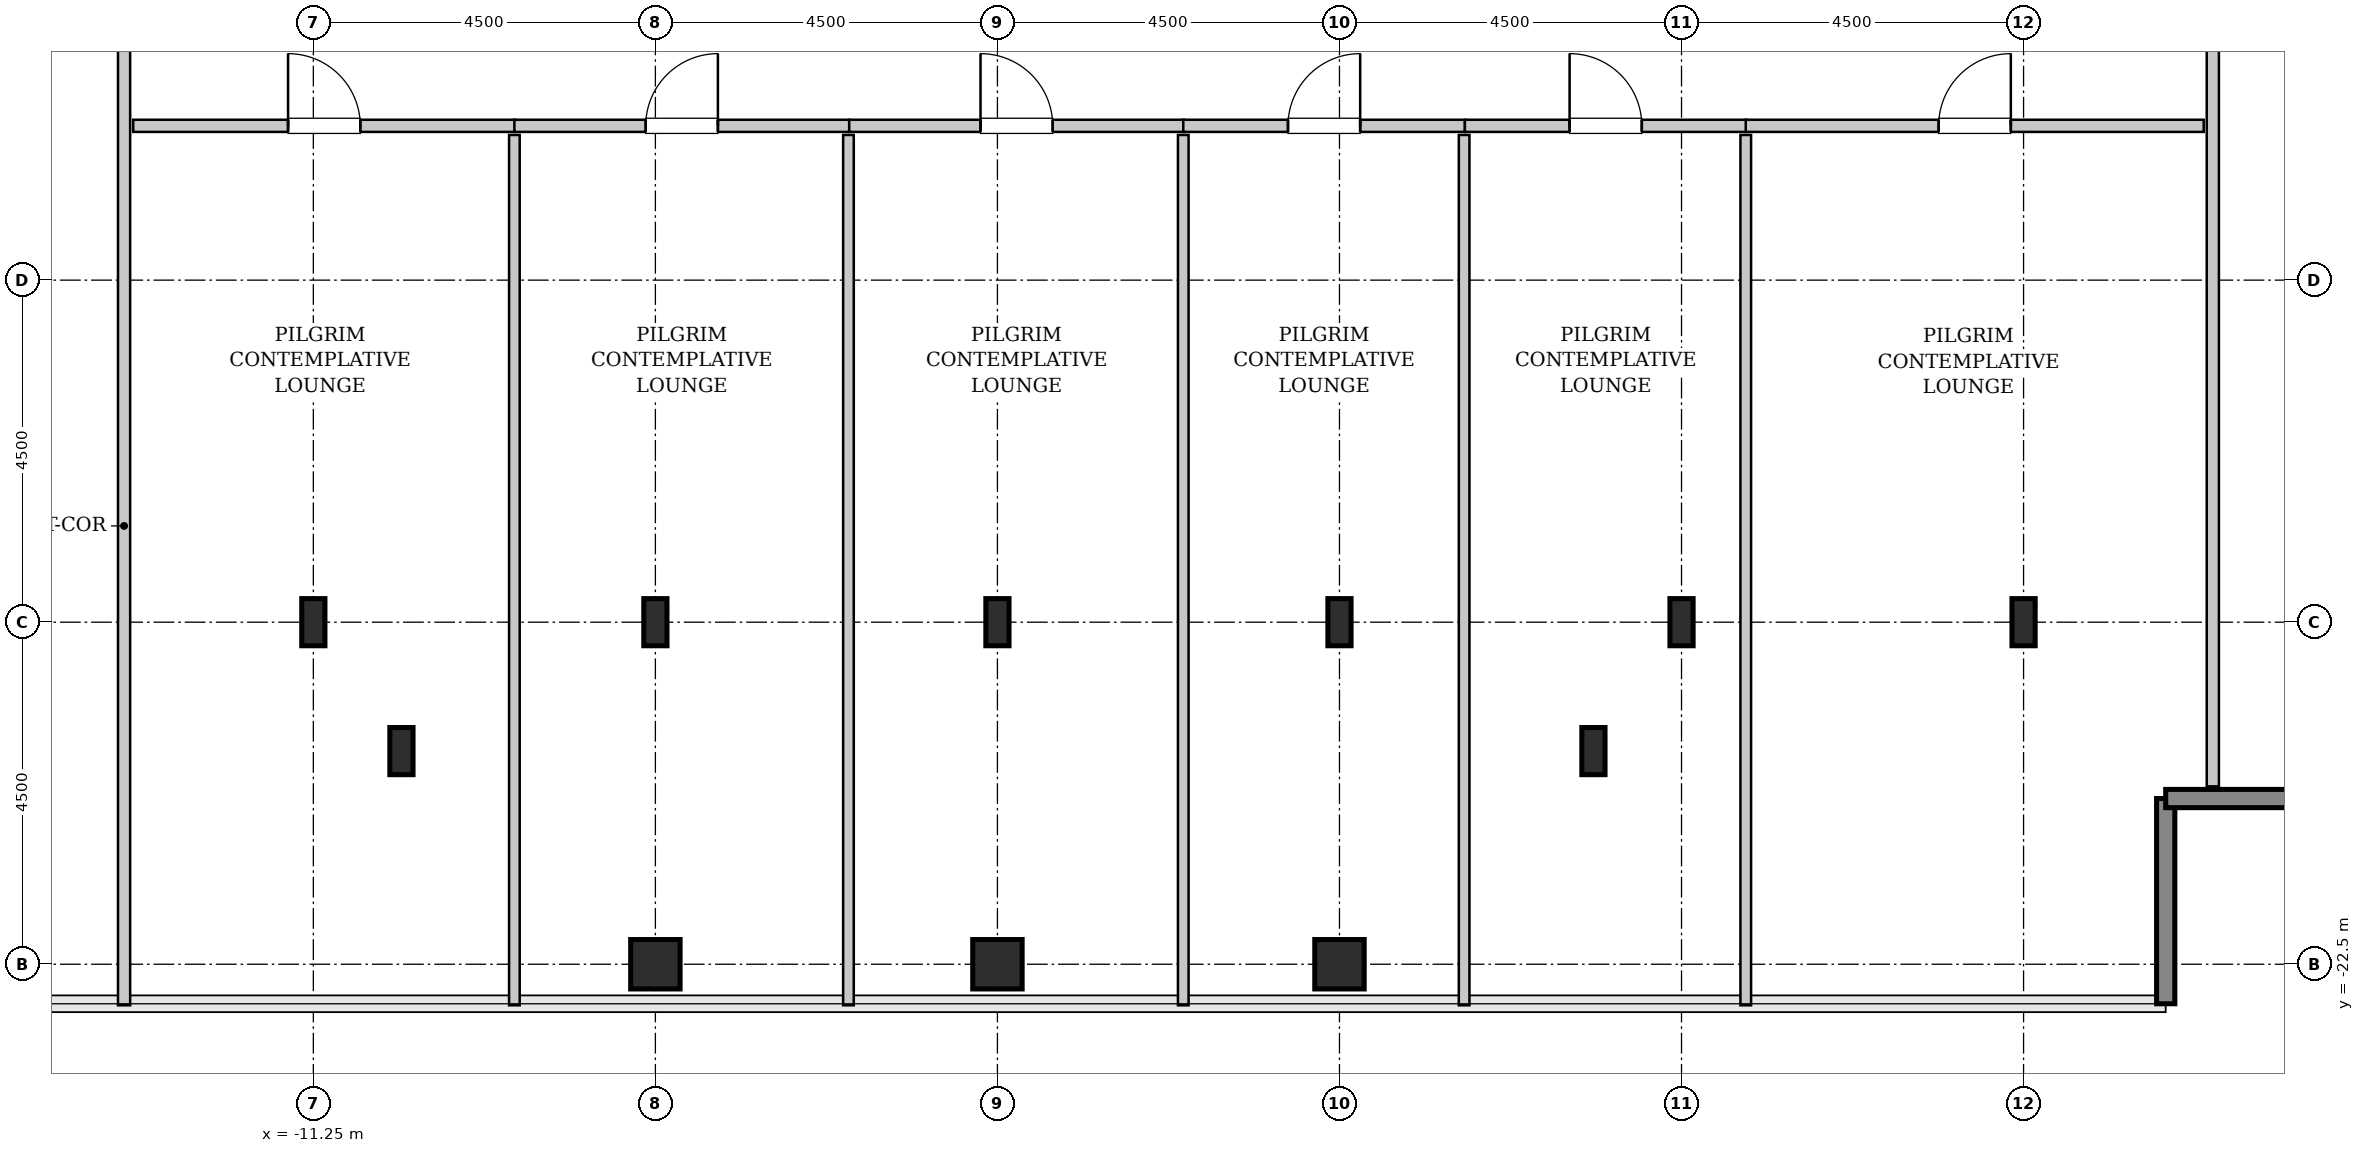
"""IFC4 building model, lengths in metres.
Left out: names, types, materials, properties, quantities, classifications, styles, units other than length and angle.
Written with IfcOpenShell. Run it as: python <this file> out.ifc"""

import sys

from ifc_helpers import new_model, si_unit, direction, frame, frame_2d, origin, origin_2d, place, context, subcontext, project, spatial, rectangle, hollow_rectangle, i_section, extrude, source, transform, mapped, element, fill, save


model = new_model("IFC4")
c1 = context("Model", 3, precision=1e-05, world=origin(), true_north=direction((0.0, 1.0)))
c2 = subcontext(c1, "Body", "Model", "MODEL_VIEW")
j1 = project(units=[si_unit("LENGTHUNIT", "METRE"), si_unit("PLANEANGLEUNIT", "RADIAN")], contexts=[c1])
p1 = place(None, origin())
s1 = spatial("IfcSite", under=j1, at=p1, CompositionType="ELEMENT")
p2 = place(p1, origin())
s2 = spatial("IfcBuilding", under=s1, at=p2, CompositionType="ELEMENT")
p3 = place(p2, frame((0.0, 0.0, 276.0)))
s3 = spatial("IfcBuildingStorey", under=s2, at=p3, CompositionType="ELEMENT", Elevation=276.0)
m1 = source(origin(), c2, "Body", "SweptSolid", [
    extrude(i_section(OverallWidth=0.305, OverallDepth=0.62, WebThickness=0.021, FlangeThickness=0.04, FilletRadius=0.027, at=origin_2d()), origin(), (0.0, 0.0, 1.0), 3.8),
])
for number, where, z_axis, x_axis in (
    (1, (-11.25, -18.0, 0.0), (0.0, 0.0, 1.0), (1.0, 0.0, 0.0)),
    (2, (-10.091, -19.696, 0.0), (0.0, 0.0, 1.0), (1.0, 0.0, 0.0)),
):
    element("IfcColumn", number, at=place(p3, frame(where, z_axis=z_axis, x_axis=x_axis)), inside=s3, PredefinedType="COLUMN", context=c2, shape_type="MappedRepresentation", body=[
        mapped(m1, transform((0.0, 0.0, 0.0), x_axis=(1.0, 0.0, 0.0), y_axis=(0.0, 1.0, 0.0), z_axis=(0.0, 0.0, 1.0), scale=1.0)),
    ])
m2 = source(origin(), c2, "Body", "SweptSolid", [
    extrude(hollow_rectangle(XDim=0.65, YDim=0.65, WallThickness=0.032, InnerFilletRadius=0.032, OuterFilletRadius=0.064, at=origin_2d()), origin(), (0.0, 0.0, 1.0), 3.8),
])
p4 = place(p3, frame((-6.75, -22.5, 0.0), z_axis=(0.0, 0.0, 1.0), x_axis=(1.0, 0.0, 0.0)))
e3 = element("IfcColumn", 3, at=p4, inside=s3, PredefinedType="COLUMN", context=c2, shape_type="MappedRepresentation", body=[
    mapped(m2, transform((0.0, 0.0, 0.0), x_axis=(1.0, 0.0, 0.0), y_axis=(0.0, 1.0, 0.0), z_axis=(0.0, 0.0, 1.0), scale=1.0)),
])
p5 = place(p3, frame((-6.75, -18.0, 0.0), z_axis=(0.0, 0.0, 1.0), x_axis=(1.0, 0.0, 0.0)))
e4 = element("IfcColumn", 4, at=p5, inside=s3, PredefinedType="COLUMN", context=c2, shape_type="MappedRepresentation", body=[
    mapped(m1, transform((0.0, 0.0, 0.0), x_axis=(1.0, 0.0, 0.0), y_axis=(0.0, 1.0, 0.0), z_axis=(0.0, 0.0, 1.0), scale=1.0)),
])
p6 = place(p3, frame((-2.25, -22.5, 0.0), z_axis=(0.0, 0.0, 1.0), x_axis=(1.0, 0.0, 0.0)))
e5 = element("IfcColumn", 5, at=p6, inside=s3, PredefinedType="COLUMN", context=c2, shape_type="MappedRepresentation", body=[
    mapped(m2, transform((0.0, 0.0, 0.0), x_axis=(1.0, 0.0, 0.0), y_axis=(0.0, 1.0, 0.0), z_axis=(0.0, 0.0, 1.0), scale=1.0)),
])
p7 = place(p3, frame((-2.25, -18.0, 0.0), z_axis=(0.0, 0.0, 1.0), x_axis=(1.0, 0.0, 0.0)))
e6 = element("IfcColumn", 6, at=p7, inside=s3, PredefinedType="COLUMN", context=c2, shape_type="MappedRepresentation", body=[
    mapped(m1, transform((0.0, 0.0, 0.0), x_axis=(1.0, 0.0, 0.0), y_axis=(0.0, 1.0, 0.0), z_axis=(0.0, 0.0, 1.0), scale=1.0)),
])
p8 = place(p3, frame((2.25, -22.5, 0.0), z_axis=(0.0, 0.0, 1.0), x_axis=(1.0, 0.0, 0.0)))
e7 = element("IfcColumn", 7, at=p8, inside=s3, PredefinedType="COLUMN", context=c2, shape_type="MappedRepresentation", body=[
    mapped(m2, transform((0.0, 0.0, 0.0), x_axis=(1.0, 0.0, 0.0), y_axis=(0.0, 1.0, 0.0), z_axis=(0.0, 0.0, 1.0), scale=1.0)),
])
for number, where, z_axis, x_axis in (
    (8, (2.25, -18.0, 0.0), (0.0, 0.0, 1.0), (1.0, 0.0, 0.0)),
    (9, (5.591, -19.696, 0.0), (0.0, 0.0, 1.0), (1.0, 0.0, 0.0)),
    (10, (6.75, -18.0, 0.0), (0.0, 0.0, 1.0), (1.0, 0.0, 0.0)),
    (11, (11.25, -18.0, 0.0), (0.0, 0.0, 1.0), (1.0, 0.0, 0.0)),
):
    element("IfcColumn", number, at=place(p3, frame(where, z_axis=z_axis, x_axis=x_axis)), inside=s3, PredefinedType="COLUMN", context=c2, shape_type="MappedRepresentation", body=[
        mapped(m1, transform((0.0, 0.0, 0.0), x_axis=(1.0, 0.0, 0.0), y_axis=(0.0, 1.0, 0.0), z_axis=(0.0, 0.0, 1.0), scale=1.0)),
    ])
m3 = source(origin(), c2, "Body", "SweptSolid", [
    extrude(rectangle(XDim=2.7, YDim=0.24, at=frame_2d((1.35, 0.0))), origin(), (0.0, 0.0, 1.0), 3.55),
])
for number, where, z_axis, x_axis in (
    (12, (13.12, -23.02, 0.0), (0.0, 0.0, 1.0), (0.0, 1.0, 0.0)),
    (13, (13.12, -20.32, 0.0), (0.0, 0.0, 1.0), (1.0, 0.0, 0.0)),
):
    element("IfcWall", number, at=place(p3, frame(where, z_axis=z_axis, x_axis=x_axis)), inside=s3, PredefinedType="SHEAR", context=c2, shape_type="MappedRepresentation", body=[
        mapped(m3, transform((0.0, 0.0, 0.0), x_axis=(1.0, 0.0, 0.0), y_axis=(0.0, 1.0, 0.0), z_axis=(0.0, 0.0, 1.0), scale=1.0)),
    ])
m4 = source(origin(), c2, "Body", "SweptSolid", [
    extrude(rectangle(XDim=14.545, YDim=0.16, at=frame_2d((7.272, 0.0))), origin(), (0.0, 0.0, 1.0), 3.535),
])
p9 = place(p3, frame((-13.74, -23.04, 0.0), z_axis=(0.0, 0.0, 1.0), x_axis=(0.0, 1.0, 0.0)))
e14 = element("IfcWall", 14, at=p9, inside=s3, PredefinedType="PARTITIONING", context=c2, shape_type="MappedRepresentation", body=[
    mapped(m4, transform((0.0, 0.0, 0.0), x_axis=(1.0, 0.0, 0.0), y_axis=(0.0, 1.0, 0.0), z_axis=(0.0, 0.0, 1.0), scale=1.0)),
])
p10 = place(p9, frame((12.562, 0.0, 0.0)))
e15 = element("IfcOpeningElement", 15, at=p10, cuts=e14, PredefinedType="OPENING", context=c2, shape_type="SweptSolid", body=[
    extrude(rectangle(XDim=0.95, YDim=2.1, at=frame_2d((0.475, 1.05))), frame((0.0, 0.09, 0.0), z_axis=(0.0, -1.0, 0.0), x_axis=(1.0, 0.0, 0.0)), (0.0, 0.0, 1.0), 0.18),
])
m5 = source(origin(), c2, "Body", "SweptSolid", [
    extrude(rectangle(XDim=12.965, YDim=0.16, at=frame_2d((6.482, 0.0))), origin(), (0.0, 0.0, 1.0), 3.535),
])
p11 = place(p3, frame((13.74, -20.16, 0.0), z_axis=(0.0, 0.0, 1.0), x_axis=(0.0, 1.0, 0.0)))
e16 = element("IfcWall", 16, at=p11, inside=s3, PredefinedType="PARTITIONING", context=c2, shape_type="MappedRepresentation", body=[
    mapped(m5, transform((0.0, 0.0, 0.0), x_axis=(1.0, 0.0, 0.0), y_axis=(0.0, 1.0, 0.0), z_axis=(0.0, 0.0, 1.0), scale=1.0)),
])
p12 = place(p11, frame((10.333, 0.0, 0.0)))
e17 = element("IfcOpeningElement", 17, at=p12, cuts=e16, PredefinedType="OPENING", context=c2, shape_type="SweptSolid", body=[
    extrude(rectangle(XDim=0.95, YDim=2.1, at=frame_2d((0.475, 1.05))), frame((0.0, 0.09, 0.0), z_axis=(0.0, -1.0, 0.0), x_axis=(1.0, 0.0, 0.0)), (0.0, 0.0, 1.0), 0.18),
])
m6 = source(origin(), c2, "Body", "SweptSolid", [
    extrude(rectangle(XDim=5.025, YDim=0.16, at=frame_2d((2.513, 0.0))), origin(), (0.0, 0.0, 1.0), 3.535),
])
p13 = place(p3, frame((-13.62, -11.47, 0.0), z_axis=(0.0, 0.0, 1.0), x_axis=(1.0, 0.0, 0.0)))
e18 = element("IfcWall", 18, at=p13, inside=s3, PredefinedType="PARTITIONING", context=c2, shape_type="MappedRepresentation", body=[
    mapped(m6, transform((0.0, 0.0, 0.0), x_axis=(1.0, 0.0, 0.0), y_axis=(0.0, 1.0, 0.0), z_axis=(0.0, 0.0, 1.0), scale=1.0)),
])
p14 = place(p13, frame((2.038, 0.0, 0.0)))
e19 = element("IfcOpeningElement", 19, at=p14, cuts=e18, PredefinedType="OPENING", context=c2, shape_type="SweptSolid", body=[
    extrude(rectangle(XDim=0.95, YDim=2.1, at=frame_2d((0.475, 1.05))), frame((0.0, 0.09, 0.0), z_axis=(0.0, -1.0, 0.0), x_axis=(1.0, 0.0, 0.0)), (0.0, 0.0, 1.0), 0.18),
])
m7 = source(origin(), c2, "Body", "SweptSolid", [
    extrude(rectangle(XDim=11.45, YDim=0.14, at=frame_2d((5.725, 0.0))), origin(), (0.0, 0.0, 1.0), 3.535),
])
p15 = place(p3, frame((-8.605, -23.04, 0.0), z_axis=(0.0, 0.0, 1.0), x_axis=(0.0, 1.0, 0.0)))
e20 = element("IfcWall", 20, at=p15, inside=s3, PredefinedType="PARTITIONING", context=c2, shape_type="MappedRepresentation", body=[
    mapped(m7, transform((0.0, 0.0, 0.0), x_axis=(1.0, 0.0, 0.0), y_axis=(0.0, 1.0, 0.0), z_axis=(0.0, 0.0, 1.0), scale=1.0)),
])
m8 = source(origin(), c2, "Body", "SweptSolid", [
    extrude(rectangle(XDim=4.405, YDim=0.16, at=frame_2d((2.203, 0.0))), origin(), (0.0, 0.0, 1.0), 3.535),
])
p16 = place(p3, frame((-8.605, -11.47, 0.0), z_axis=(0.0, 0.0, 1.0), x_axis=(1.0, 0.0, 0.0)))
e21 = element("IfcWall", 21, at=p16, inside=s3, PredefinedType="PARTITIONING", context=c2, shape_type="MappedRepresentation", body=[
    mapped(m8, transform((0.0, 0.0, 0.0), x_axis=(1.0, 0.0, 0.0), y_axis=(0.0, 1.0, 0.0), z_axis=(0.0, 0.0, 1.0), scale=1.0)),
])
p17 = place(p16, frame((1.728, 0.0, 0.0)))
e22 = element("IfcOpeningElement", 22, at=p17, cuts=e21, PredefinedType="OPENING", context=c2, shape_type="SweptSolid", body=[
    extrude(rectangle(XDim=0.95, YDim=2.1, at=frame_2d((0.475, 1.05))), frame((0.0, 0.09, 0.0), z_axis=(0.0, -1.0, 0.0), x_axis=(1.0, 0.0, 0.0)), (0.0, 0.0, 1.0), 0.18),
])
p18 = place(p3, frame((-4.21, -23.04, 0.0), z_axis=(0.0, 0.0, 1.0), x_axis=(0.0, 1.0, 0.0)))
e23 = element("IfcWall", 23, at=p18, inside=s3, PredefinedType="PARTITIONING", context=c2, shape_type="MappedRepresentation", body=[
    mapped(m7, transform((0.0, 0.0, 0.0), x_axis=(1.0, 0.0, 0.0), y_axis=(0.0, 1.0, 0.0), z_axis=(0.0, 0.0, 1.0), scale=1.0)),
])
p19 = place(p3, frame((-4.2, -11.47, 0.0), z_axis=(0.0, 0.0, 1.0), x_axis=(1.0, 0.0, 0.0)))
e24 = element("IfcWall", 24, at=p19, inside=s3, PredefinedType="PARTITIONING", context=c2, shape_type="MappedRepresentation", body=[
    mapped(m8, transform((0.0, 0.0, 0.0), x_axis=(1.0, 0.0, 0.0), y_axis=(0.0, 1.0, 0.0), z_axis=(0.0, 0.0, 1.0), scale=1.0)),
])
p20 = place(p19, frame((1.728, 0.0, 0.0)))
e25 = element("IfcOpeningElement", 25, at=p20, cuts=e24, PredefinedType="OPENING", context=c2, shape_type="SweptSolid", body=[
    extrude(rectangle(XDim=0.95, YDim=2.1, at=frame_2d((0.475, 1.05))), frame((0.0, 0.09, 0.0), z_axis=(0.0, -1.0, 0.0), x_axis=(1.0, 0.0, 0.0)), (0.0, 0.0, 1.0), 0.18),
])
p21 = place(p3, frame((0.195, -23.04, 0.0), z_axis=(0.0, 0.0, 1.0), x_axis=(0.0, 1.0, 0.0)))
e26 = element("IfcWall", 26, at=p21, inside=s3, PredefinedType="PARTITIONING", context=c2, shape_type="MappedRepresentation", body=[
    mapped(m7, transform((0.0, 0.0, 0.0), x_axis=(1.0, 0.0, 0.0), y_axis=(0.0, 1.0, 0.0), z_axis=(0.0, 0.0, 1.0), scale=1.0)),
])
m9 = source(origin(), c2, "Body", "SweptSolid", [
    extrude(rectangle(XDim=3.705, YDim=0.16, at=frame_2d((1.853, 0.0))), origin(), (0.0, 0.0, 1.0), 3.535),
])
p22 = place(p3, frame((0.195, -11.47, 0.0), z_axis=(0.0, 0.0, 1.0), x_axis=(1.0, 0.0, 0.0)))
e27 = element("IfcWall", 27, at=p22, inside=s3, PredefinedType="PARTITIONING", context=c2, shape_type="MappedRepresentation", body=[
    mapped(m9, transform((0.0, 0.0, 0.0), x_axis=(1.0, 0.0, 0.0), y_axis=(0.0, 1.0, 0.0), z_axis=(0.0, 0.0, 1.0), scale=1.0)),
])
p23 = place(p22, frame((1.377, 0.0, 0.0)))
e28 = element("IfcOpeningElement", 28, at=p23, cuts=e27, PredefinedType="OPENING", context=c2, shape_type="SweptSolid", body=[
    extrude(rectangle(XDim=0.95, YDim=2.1, at=frame_2d((0.475, 1.05))), frame((0.0, 0.09, 0.0), z_axis=(0.0, -1.0, 0.0), x_axis=(1.0, 0.0, 0.0)), (0.0, 0.0, 1.0), 0.18),
])
p24 = place(p3, frame((3.89, -23.04, 0.0), z_axis=(0.0, 0.0, 1.0), x_axis=(0.0, 1.0, 0.0)))
e29 = element("IfcWall", 29, at=p24, inside=s3, PredefinedType="PARTITIONING", context=c2, shape_type="MappedRepresentation", body=[
    mapped(m7, transform((0.0, 0.0, 0.0), x_axis=(1.0, 0.0, 0.0), y_axis=(0.0, 1.0, 0.0), z_axis=(0.0, 0.0, 1.0), scale=1.0)),
])
m10 = source(origin(), c2, "Body", "SweptSolid", [
    extrude(rectangle(XDim=3.705, YDim=0.16, at=frame_2d((1.853, 0.0))), origin(), (0.0, 0.0, 1.0), 3.535),
])
p25 = place(p3, frame((3.9, -11.47, 0.0), z_axis=(0.0, 0.0, 1.0), x_axis=(1.0, 0.0, 0.0)))
e30 = element("IfcWall", 30, at=p25, inside=s3, PredefinedType="PARTITIONING", context=c2, shape_type="MappedRepresentation", body=[
    mapped(m10, transform((0.0, 0.0, 0.0), x_axis=(1.0, 0.0, 0.0), y_axis=(0.0, 1.0, 0.0), z_axis=(0.0, 0.0, 1.0), scale=1.0)),
])
p26 = place(p25, frame((1.377, 0.0, 0.0)))
e31 = element("IfcOpeningElement", 31, at=p26, cuts=e30, PredefinedType="OPENING", context=c2, shape_type="SweptSolid", body=[
    extrude(rectangle(XDim=0.95, YDim=2.1, at=frame_2d((0.475, 1.05))), frame((0.0, 0.09, 0.0), z_axis=(0.0, -1.0, 0.0), x_axis=(1.0, 0.0, 0.0)), (0.0, 0.0, 1.0), 0.18),
])
p27 = place(p3, frame((7.595, -23.04, 0.0), z_axis=(0.0, 0.0, 1.0), x_axis=(0.0, 1.0, 0.0)))
e32 = element("IfcWall", 32, at=p27, inside=s3, PredefinedType="PARTITIONING", context=c2, shape_type="MappedRepresentation", body=[
    mapped(m7, transform((0.0, 0.0, 0.0), x_axis=(1.0, 0.0, 0.0), y_axis=(0.0, 1.0, 0.0), z_axis=(0.0, 0.0, 1.0), scale=1.0)),
])
m11 = source(origin(), c2, "Body", "SweptSolid", [
    extrude(rectangle(XDim=6.025, YDim=0.16, at=frame_2d((3.013, 0.0))), origin(), (0.0, 0.0, 1.0), 3.535),
])
p28 = place(p3, frame((7.595, -11.47, 0.0), z_axis=(0.0, 0.0, 1.0), x_axis=(1.0, 0.0, 0.0)))
e33 = element("IfcWall", 33, at=p28, inside=s3, PredefinedType="PARTITIONING", context=c2, shape_type="MappedRepresentation", body=[
    mapped(m11, transform((0.0, 0.0, 0.0), x_axis=(1.0, 0.0, 0.0), y_axis=(0.0, 1.0, 0.0), z_axis=(0.0, 0.0, 1.0), scale=1.0)),
])
p29 = place(p28, frame((2.538, 0.0, 0.0)))
e34 = element("IfcOpeningElement", 34, at=p29, cuts=e33, PredefinedType="OPENING", context=c2, shape_type="SweptSolid", body=[
    extrude(rectangle(XDim=0.95, YDim=2.1, at=frame_2d((0.475, 1.05))), frame((0.0, 0.09, 0.0), z_axis=(0.0, -1.0, 0.0), x_axis=(1.0, 0.0, 0.0)), (0.0, 0.0, 1.0), 0.18),
])
m12 = source(origin(), c2, "Body", "SweptSolid", [
    extrude(rectangle(XDim=0.95, YDim=2.1, at=frame_2d((0.475, 1.05))), frame((0.0, 0.025, 0.0), z_axis=(0.0, -1.0, 0.0), x_axis=(1.0, 0.0, 0.0)), (0.0, 0.0, 1.0), 0.05),
])
p30 = place(p14, origin())
e35 = element("IfcDoor", 35, at=p30, inside=s3, OperationType="SINGLE_SWING_LEFT", PredefinedType="DOOR", context=c2, shape_type="MappedRepresentation", body=[
    mapped(m12, transform((0.0, 0.0, 0.0), x_axis=(1.0, 0.0, 0.0), y_axis=(0.0, 1.0, 0.0), z_axis=(0.0, 0.0, 1.0), scale=1.0)),
])
fill(e19, e35)
p31 = place(p17, origin())
e36 = element("IfcDoor", 36, at=p31, inside=s3, OperationType="SINGLE_SWING_RIGHT", PredefinedType="DOOR", context=c2, shape_type="MappedRepresentation", body=[
    mapped(m12, transform((0.0, 0.0, 0.0), x_axis=(1.0, 0.0, 0.0), y_axis=(0.0, 1.0, 0.0), z_axis=(0.0, 0.0, 1.0), scale=1.0)),
])
fill(e22, e36)
p32 = place(p20, origin())
e37 = element("IfcDoor", 37, at=p32, inside=s3, OperationType="SINGLE_SWING_LEFT", PredefinedType="DOOR", context=c2, shape_type="MappedRepresentation", body=[
    mapped(m12, transform((0.0, 0.0, 0.0), x_axis=(1.0, 0.0, 0.0), y_axis=(0.0, 1.0, 0.0), z_axis=(0.0, 0.0, 1.0), scale=1.0)),
])
fill(e25, e37)
p33 = place(p23, origin())
e38 = element("IfcDoor", 38, at=p33, inside=s3, OperationType="SINGLE_SWING_RIGHT", PredefinedType="DOOR", context=c2, shape_type="MappedRepresentation", body=[
    mapped(m12, transform((0.0, 0.0, 0.0), x_axis=(1.0, 0.0, 0.0), y_axis=(0.0, 1.0, 0.0), z_axis=(0.0, 0.0, 1.0), scale=1.0)),
])
fill(e28, e38)
p34 = place(p26, origin())
e39 = element("IfcDoor", 39, at=p34, inside=s3, OperationType="SINGLE_SWING_LEFT", PredefinedType="DOOR", context=c2, shape_type="MappedRepresentation", body=[
    mapped(m12, transform((0.0, 0.0, 0.0), x_axis=(1.0, 0.0, 0.0), y_axis=(0.0, 1.0, 0.0), z_axis=(0.0, 0.0, 1.0), scale=1.0)),
])
fill(e31, e39)
p35 = place(p29, origin())
e40 = element("IfcDoor", 40, at=p35, inside=s3, OperationType="SINGLE_SWING_RIGHT", PredefinedType="DOOR", context=c2, shape_type="MappedRepresentation", body=[
    mapped(m12, transform((0.0, 0.0, 0.0), x_axis=(1.0, 0.0, 0.0), y_axis=(0.0, 1.0, 0.0), z_axis=(0.0, 0.0, 1.0), scale=1.0)),
])
fill(e34, e40)
save(model, sys.argv[1])
